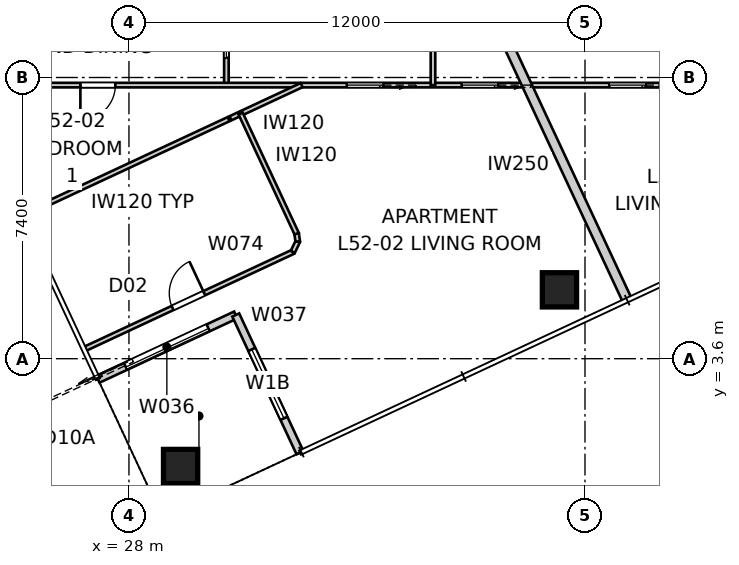
"""IFC4 building model, lengths in metres.
Left out: names, types, materials, properties, quantities, classifications, styles, units other than length and angle.
Written with IfcOpenShell. Run it as: python <this file> out.ifc"""

import sys

from ifc_helpers import new_model, si_unit, direction, frame, frame_2d, origin, origin_2d, place, context, subcontext, project, spatial, rectangle, extrude, element, fill, save


model = new_model("IFC4")
c1 = context("Model", 3, precision=1e-05, world=origin(), true_north=direction((0.0, 1.0)))
c2 = subcontext(c1, "Body", "Model", "MODEL_VIEW")
j1 = project(units=[si_unit("LENGTHUNIT", "METRE"), si_unit("PLANEANGLEUNIT", "RADIAN")], contexts=[c1])
p1 = place(None, origin())
s1 = spatial("IfcSite", under=j1, at=p1, CompositionType="ELEMENT")
p2 = place(p1, origin())
s2 = spatial("IfcBuilding", under=s1, at=p2, CompositionType="ELEMENT")
p3 = place(p2, frame((0.0, 0.0, 189.6)))
s3 = spatial("IfcBuildingStorey", under=s2, at=p3, CompositionType="ELEMENT", Elevation=189.6)
for number, where, z_axis, x_axis in (
    (1, (29.359, 0.764, 0.0), (0.0, 0.0, 1.0), (1.0, 0.0, 0.0)),
    (2, (39.328, 5.412, 0.0), (0.0, 0.0, 1.0), (1.0, 0.0, 0.0)),
):
    element("IfcColumn", number, at=place(p3, frame(where, z_axis=z_axis, x_axis=x_axis)), inside=s3, PredefinedType="COLUMN", context=c2, shape_type="SweptSolid", body=[
        extrude(rectangle(XDim=0.9, YDim=0.9, at=origin_2d()), origin(), (0.0, 0.0, 1.0), 3.4),
    ])
p4 = place(p3, frame((27.185, 3.06, 0.0), z_axis=(0.0, 0.0, 1.0), x_axis=(0.906289140828, 0.422658246362, 0.0)))
e3 = element("IfcWall", 3, at=p4, inside=s3, PredefinedType="SOLIDWALL", context=c2, shape_type="SweptSolid", body=[
    extrude(rectangle(XDim=4.0, YDim=0.2, at=frame_2d((2.0, 0.0))), origin(), (0.0, 0.0, 1.0), 3.25),
])
p5 = place(p4, frame((0.8, 0.0, 0.0)))
e4 = element("IfcOpeningElement", 4, at=p5, cuts=e3, PredefinedType="OPENING", context=c2, shape_type="SweptSolid", body=[
    extrude(rectangle(XDim=2.4, YDim=2.1, at=frame_2d((1.2, 1.05))), frame((0.0, 0.11, 0.0), z_axis=(0.0, -1.0, 0.0), x_axis=(1.0, 0.0, 0.0)), (0.0, 0.0, 1.0), 0.22),
])
p6 = place(p3, frame((30.81, 4.75, 0.0), z_axis=(0.0, 0.0, 1.0), x_axis=(0.422658246362, -0.906289140828, 0.0)))
e5 = element("IfcWall", 5, at=p6, inside=s3, PredefinedType="SOLIDWALL", context=c2, shape_type="SweptSolid", body=[
    extrude(rectangle(XDim=4.0, YDim=0.2, at=frame_2d((2.0, 0.0))), origin(), (0.0, 0.0, 1.0), 3.25),
])
p7 = place(p6, frame((1.0, 0.0, 0.45)))
e6 = element("IfcOpeningElement", 6, at=p7, cuts=e5, PredefinedType="OPENING", context=c2, shape_type="SweptSolid", body=[
    extrude(rectangle(XDim=2.0, YDim=1.8, at=frame_2d((1.0, 0.9))), frame((0.0, 0.11, 0.0), z_axis=(0.0, -1.0, 0.0), x_axis=(1.0, 0.0, 0.0)), (0.0, 0.0, 1.0), 0.22),
])
p8 = place(p3, frame((41.11, 5.14, 0.0), z_axis=(0.0, 0.0, 1.0), x_axis=(-0.42262942879, 0.906302579672, 0.0)))
e7 = element("IfcWall", 7, at=p8, inside=s3, PredefinedType="PARTITIONING", context=c2, shape_type="SweptSolid", body=[
    extrude(rectangle(XDim=8.875, YDim=0.25, at=frame_2d((4.438, 0.0))), origin(), (0.0, 0.0, 1.0), 3.25),
])
p9 = place(p3, frame((30.564, 13.2, 0.0), z_axis=(0.0, 0.0, 1.0), x_axis=(0.0, -1.0, 0.0)))
e8 = element("IfcWall", 8, at=p9, inside=s3, PredefinedType="PARTITIONING", context=c2, shape_type="SweptSolid", body=[
    extrude(rectangle(XDim=2.4, YDim=0.12, at=frame_2d((1.2, 0.0))), origin(), (0.0, 0.0, 1.0), 3.25),
])
p10 = place(p9, frame((0.72, 0.0, 0.0)))
e9 = element("IfcOpeningElement", 9, at=p10, cuts=e8, PredefinedType="OPENING", context=c2, shape_type="SweptSolid", body=[
    extrude(rectangle(XDim=0.96, YDim=2.1, at=frame_2d((0.48, 1.05))), frame((0.0, 0.07, 0.0), z_axis=(0.0, -1.0, 0.0), x_axis=(1.0, 0.0, 0.0)), (0.0, 0.0, 1.0), 0.14),
])
p11 = place(p3, frame((53.208, 10.8, 0.0), z_axis=(0.0, 0.0, 1.0), x_axis=(-1.0, 0.0, 0.0)))
e10 = element("IfcWall", 10, at=p11, inside=s3, PredefinedType="PARTITIONING", context=c2, shape_type="SweptSolid", body=[
    extrude(rectangle(XDim=29.593, YDim=0.12, at=frame_2d((14.796, 0.0))), origin(), (0.0, 0.0, 1.0), 3.25),
])
p12 = place(p11, frame((6.074, 0.0, 0.0)))
e11 = element("IfcOpeningElement", 11, at=p12, cuts=e10, PredefinedType="OPENING", context=c2, shape_type="SweptSolid", body=[
    extrude(rectangle(XDim=0.92, YDim=2.34, at=frame_2d((0.46, 1.17))), frame((0.0, 0.07, 0.0), z_axis=(0.0, -1.0, 0.0), x_axis=(1.0, 0.0, 0.0)), (0.0, 0.0, 1.0), 0.14),
])
p13 = place(p11, frame((25.566, 0.0, 0.0)))
e12 = element("IfcOpeningElement", 12, at=p13, cuts=e10, PredefinedType="OPENING", context=c2, shape_type="SweptSolid", body=[
    extrude(rectangle(XDim=0.92, YDim=2.34, at=frame_2d((0.46, 1.17))), frame((0.0, 0.07, 0.0), z_axis=(0.0, -1.0, 0.0), x_axis=(1.0, 0.0, 0.0)), (0.0, 0.0, 1.0), 0.14),
])
p14 = place(p11, frame((18.515, 0.0, 0.0)))
e13 = element("IfcOpeningElement", 13, at=p14, cuts=e10, PredefinedType="OPENING", context=c2, shape_type="SweptSolid", body=[
    extrude(rectangle(XDim=0.96, YDim=2.1, at=frame_2d((0.48, 1.05))), frame((0.0, 0.07, 0.0), z_axis=(0.0, -1.0, 0.0), x_axis=(1.0, 0.0, 0.0)), (0.0, 0.0, 1.0), 0.14),
])
p15 = place(p11, frame((15.493, 0.0, 0.0)))
e14 = element("IfcOpeningElement", 14, at=p15, cuts=e10, PredefinedType="OPENING", context=c2, shape_type="SweptSolid", body=[
    extrude(rectangle(XDim=0.96, YDim=2.1, at=frame_2d((0.48, 1.05))), frame((0.0, 0.07, 0.0), z_axis=(0.0, -1.0, 0.0), x_axis=(1.0, 0.0, 0.0)), (0.0, 0.0, 1.0), 0.14),
])
p16 = place(p11, frame((11.609, 0.0, 0.0)))
e15 = element("IfcOpeningElement", 15, at=p16, cuts=e10, PredefinedType="OPENING", context=c2, shape_type="SweptSolid", body=[
    extrude(rectangle(XDim=0.96, YDim=2.1, at=frame_2d((0.48, 1.05))), frame((0.0, 0.07, 0.0), z_axis=(0.0, -1.0, 0.0), x_axis=(1.0, 0.0, 0.0)), (0.0, 0.0, 1.0), 0.14),
])
p17 = place(p3, frame((36.0, 13.2, 0.0), z_axis=(0.0, 0.0, 1.0), x_axis=(0.0, -1.0, 0.0)))
e16 = element("IfcWall", 16, at=p17, inside=s3, PredefinedType="PARTITIONING", context=c2, shape_type="SweptSolid", body=[
    extrude(rectangle(XDim=2.4, YDim=0.12, at=frame_2d((1.2, 0.0))), origin(), (0.0, 0.0, 1.0), 3.25),
])
p18 = place(p3, frame((30.671, 9.927, 0.0), z_axis=(0.0, 0.0, 1.0), x_axis=(0.906306821634, 0.422620332048, 0.0)))
e17 = element("IfcWall", 17, at=p18, inside=s3, PredefinedType="PARTITIONING", context=c2, shape_type="SweptSolid", body=[
    extrude(rectangle(XDim=2.067, YDim=0.12, at=frame_2d((1.033, 0.0))), origin(), (0.0, 0.0, 1.0), 3.25),
])
p19 = place(p3, frame((26.854, 3.865, 0.0), z_axis=(0.0, 0.0, 1.0), x_axis=(0.906251488513, 0.422738973325, 0.0)))
e18 = element("IfcWall", 18, at=p19, inside=s3, PredefinedType="PARTITIONING", context=c2, shape_type="SweptSolid", body=[
    extrude(rectangle(XDim=6.022, YDim=0.12, at=frame_2d((3.011, 0.0))), origin(), (0.0, 0.0, 1.0), 3.25),
])
p20 = place(p19, frame((2.531, 0.0, 0.0)))
e19 = element("IfcOpeningElement", 19, at=p20, cuts=e18, PredefinedType="OPENING", context=c2, shape_type="SweptSolid", body=[
    extrude(rectangle(XDim=0.92, YDim=2.34, at=frame_2d((0.46, 1.17))), frame((0.0, 0.07, 0.0), z_axis=(0.0, -1.0, 0.0), x_axis=(1.0, 0.0, 0.0)), (0.0, 0.0, 1.0), 0.14),
])
p21 = place(p3, frame((32.311, 6.41, 0.0), z_axis=(0.0, 0.0, 1.0), x_axis=(0.432992694072, 0.901397430039, 0.0)))
e20 = element("IfcWall", 20, at=p21, inside=s3, PredefinedType="PARTITIONING", context=c2, shape_type="SweptSolid", body=[
    extrude(rectangle(XDim=0.303, YDim=0.12, at=frame_2d((0.152, 0.0))), origin(), (0.0, 0.0, 1.0), 3.25),
])
p22 = place(p3, frame((32.442, 6.684, 0.0), z_axis=(0.0, 0.0, 1.0), x_axis=(-0.1412579154, 0.989972828585, 0.0)))
e21 = element("IfcWall", 21, at=p22, inside=s3, PredefinedType="PARTITIONING", context=c2, shape_type="SweptSolid", body=[
    extrude(rectangle(XDim=0.209, YDim=0.12, at=frame_2d((0.104, 0.0))), origin(), (0.0, 0.0, 1.0), 3.25),
])
p23 = place(p3, frame((32.413, 6.891, 0.0), z_axis=(0.0, 0.0, 1.0), x_axis=(-0.422628673033, 0.906302932099, 0.0)))
e22 = element("IfcWall", 22, at=p23, inside=s3, PredefinedType="PARTITIONING", context=c2, shape_type="SweptSolid", body=[
    extrude(rectangle(XDim=3.487, YDim=0.12, at=frame_2d((1.744, 0.0))), origin(), (0.0, 0.0, 1.0), 3.25),
])
p24 = place(p3, frame((30.622, 9.904, 0.0), z_axis=(0.0, 0.0, 1.0), x_axis=(-0.906317929608, -0.422596510244, 0.0)))
e23 = element("IfcWall", 23, at=p24, inside=s3, PredefinedType="PARTITIONING", context=c2, shape_type="SweptSolid", body=[
    extrude(rectangle(XDim=5.967, YDim=0.12, at=frame_2d((2.984, 0.0))), origin(), (0.0, 0.0, 1.0), 3.25),
])
p25 = place(p5, origin())
e24 = element("IfcDoor", 24, at=p25, inside=s3, OperationType="SLIDING_TO_LEFT", PredefinedType="DOOR", context=c2, shape_type="SweptSolid", body=[
    extrude(rectangle(XDim=2.4, YDim=2.1, at=frame_2d((1.2, 1.05))), frame((0.0, 0.025, 0.0), z_axis=(0.0, -1.0, 0.0), x_axis=(1.0, 0.0, 0.0)), (0.0, 0.0, 1.0), 0.05),
])
fill(e4, e24)
p26 = place(p7, origin())
e25 = element("IfcWindow", 25, at=p26, inside=s3, PartitioningType="SINGLE_PANEL", PredefinedType="WINDOW", context=c2, shape_type="SweptSolid", body=[
    extrude(rectangle(XDim=2.0, YDim=1.8, at=frame_2d((1.0, 0.9))), frame((0.0, 0.03, 0.0), z_axis=(0.0, -1.0, 0.0), x_axis=(1.0, 0.0, 0.0)), (0.0, 0.0, 1.0), 0.06),
])
fill(e6, e25)
p27 = place(p13, origin())
e26 = element("IfcDoor", 26, at=p27, inside=s3, OperationType="SINGLE_SWING_RIGHT", PredefinedType="DOOR", context=c2, shape_type="SweptSolid", body=[
    extrude(rectangle(XDim=0.92, YDim=2.34, at=frame_2d((0.46, 1.17))), frame((0.0, 0.025, 0.0), z_axis=(0.0, -1.0, 0.0), x_axis=(1.0, 0.0, 0.0)), (0.0, 0.0, 1.0), 0.05),
])
fill(e12, e26)
p28 = place(p10, origin())
e27 = element("IfcDoor", 27, at=p28, inside=s3, OperationType="SLIDING_TO_LEFT", PredefinedType="DOOR", context=c2, shape_type="SweptSolid", body=[
    extrude(rectangle(XDim=0.96, YDim=2.1, at=frame_2d((0.48, 1.05))), frame((0.0, 0.025, 0.0), z_axis=(0.0, -1.0, 0.0), x_axis=(1.0, 0.0, 0.0)), (0.0, 0.0, 1.0), 0.05),
])
fill(e9, e27)
p29 = place(p14, origin())
e28 = element("IfcDoor", 28, at=p29, inside=s3, OperationType="SLIDING_TO_LEFT", PredefinedType="DOOR", context=c2, shape_type="SweptSolid", body=[
    extrude(rectangle(XDim=0.96, YDim=2.1, at=frame_2d((0.48, 1.05))), frame((0.0, 0.025, 0.0), z_axis=(0.0, -1.0, 0.0), x_axis=(1.0, 0.0, 0.0)), (0.0, 0.0, 1.0), 0.05),
])
fill(e13, e28)
p30 = place(p20, origin())
e29 = element("IfcDoor", 29, at=p30, inside=s3, OperationType="SINGLE_SWING_RIGHT", PredefinedType="DOOR", context=c2, shape_type="SweptSolid", body=[
    extrude(rectangle(XDim=0.92, YDim=2.34, at=frame_2d((0.46, 1.17))), frame((0.0, 0.025, 0.0), z_axis=(0.0, -1.0, 0.0), x_axis=(1.0, 0.0, 0.0)), (0.0, 0.0, 1.0), 0.05),
])
fill(e19, e29)
p31 = place(p15, origin())
e30 = element("IfcDoor", 30, at=p31, inside=s3, OperationType="SLIDING_TO_LEFT", PredefinedType="DOOR", context=c2, shape_type="SweptSolid", body=[
    extrude(rectangle(XDim=0.96, YDim=2.1, at=frame_2d((0.48, 1.05))), frame((0.0, 0.025, 0.0), z_axis=(0.0, -1.0, 0.0), x_axis=(1.0, 0.0, 0.0)), (0.0, 0.0, 1.0), 0.05),
])
fill(e14, e30)
p32 = place(p16, origin())
e31 = element("IfcDoor", 31, at=p32, inside=s3, OperationType="SLIDING_TO_LEFT", PredefinedType="DOOR", context=c2, shape_type="SweptSolid", body=[
    extrude(rectangle(XDim=0.96, YDim=2.1, at=frame_2d((0.48, 1.05))), frame((0.0, 0.025, 0.0), z_axis=(0.0, -1.0, 0.0), x_axis=(1.0, 0.0, 0.0)), (0.0, 0.0, 1.0), 0.05),
])
fill(e15, e31)
save(model, sys.argv[1])
